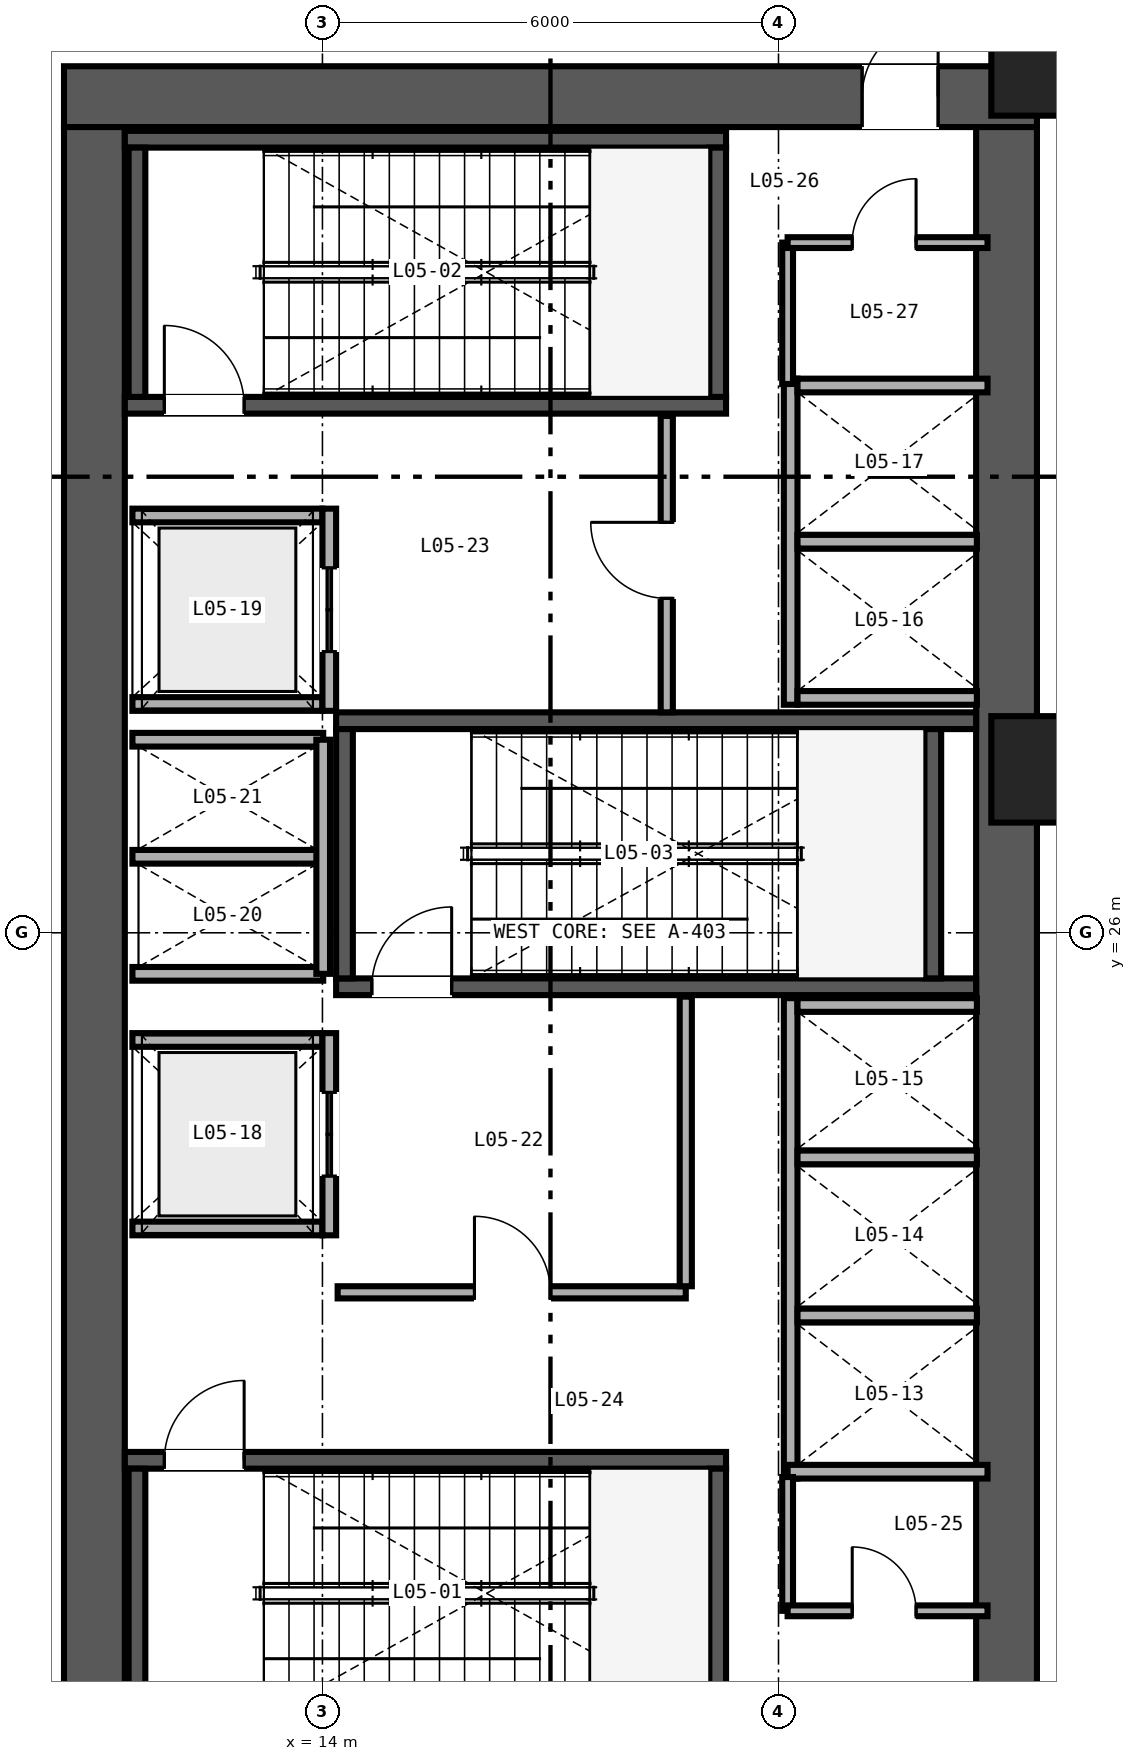
"""IFC4 building model, lengths in metres.
Left out: names, types, materials, properties, quantities, classifications, styles, units other than length and angle.
Written with IfcOpenShell. Run it as: python <this file> out.ifc"""

import sys

from ifc_helpers import new_model, si_unit, direction, frame, frame_2d, origin, origin_2d, place, context, subcontext, project, spatial, rectangle, extrude, source, transform, mapped, element, fill, save


model = new_model("IFC4")
c1 = context("Model", 3, precision=1e-05, world=origin(), true_north=direction((0.0, 1.0)))
c2 = subcontext(c1, "Body", "Model", "MODEL_VIEW")
j1 = project(units=[si_unit("LENGTHUNIT", "METRE"), si_unit("PLANEANGLEUNIT", "RADIAN")], contexts=[c1])
p1 = place(None, origin())
s1 = spatial("IfcSite", under=j1, at=p1, CompositionType="ELEMENT")
p2 = place(p1, origin())
s2 = spatial("IfcBuilding", under=s1, at=p2, CompositionType="ELEMENT")
p3 = place(p2, frame((0.0, 0.0, 24.0)))
s3 = spatial("IfcBuildingStorey", under=s2, at=p3, CompositionType="ELEMENT", Elevation=24.0)
p4 = place(p3, frame((10.6, 37.0, 0.0), z_axis=(0.0, 0.0, 1.0), x_axis=(1.0, 0.0, 0.0)))
e1 = element("IfcWall", 1, at=p4, inside=s3, PredefinedType="SHEAR", context=c2, shape_type="SweptSolid", body=[
    extrude(rectangle(XDim=12.8, YDim=0.8, at=frame_2d((6.4, 0.0))), origin(), (0.0, 0.0, 1.0), 4.48),
])
p5 = place(p4, frame((10.5, 0.0, 0.0)))
e2 = element("IfcOpeningElement", 2, at=p5, cuts=e1, PredefinedType="OPENING", context=c2, shape_type="SweptSolid", body=[
    extrude(rectangle(XDim=1.0, YDim=2.15, at=frame_2d((0.5, 1.075))), frame((0.0, 0.41, 0.0), z_axis=(0.0, -1.0, 0.0), x_axis=(1.0, 0.0, 0.0)), (0.0, 0.0, 1.0), 0.82),
])
for number, where, z_axis, x_axis in (
    (3, (11.0, 15.4, 0.0), (0.0, 0.0, 1.0), (0.0, 1.0, 0.0)),
    (4, (23.0, 15.4, 0.0), (0.0, 0.0, 1.0), (0.0, 1.0, 0.0)),
):
    element("IfcWall", number, at=place(p3, frame(where, z_axis=z_axis, x_axis=x_axis)), inside=s3, PredefinedType="SHEAR", context=c2, shape_type="SweptSolid", body=[
        extrude(rectangle(XDim=21.2, YDim=0.8, at=frame_2d((10.6, 0.0))), origin(), (0.0, 0.0, 1.0), 4.48),
    ])
p6 = place(p3, frame((11.4, 19.06, 0.0), z_axis=(0.0, 0.0, 1.0), x_axis=(1.0, 0.0, 0.0)))
e5 = element("IfcWall", 5, at=p6, inside=s3, PredefinedType="SHEAR", context=c2, shape_type="SweptSolid", body=[
    extrude(rectangle(XDim=7.91, YDim=0.22, at=frame_2d((3.955, 0.0))), origin(), (0.0, 0.0, 1.0), 4.6),
])
p7 = place(p6, frame((0.52, 0.0, 0.0)))
e6 = element("IfcOpeningElement", 6, at=p7, cuts=e5, PredefinedType="OPENING", context=c2, shape_type="SweptSolid", body=[
    extrude(rectangle(XDim=1.05, YDim=2.15, at=frame_2d((0.525, 1.075))), frame((0.0, 0.12, 0.0), z_axis=(0.0, -1.0, 0.0), x_axis=(1.0, 0.0, 0.0)), (0.0, 0.0, 1.0), 0.24),
])
for number, where, z_axis, x_axis in (
    (7, (11.56, 15.67, 0.0), (0.0, 0.0, 1.0), (0.0, 1.0, 0.0)),
    (8, (19.2, 15.67, 0.0), (0.0, 0.0, 1.0), (0.0, 1.0, 0.0)),
):
    element("IfcWall", number, at=place(p3, frame(where, z_axis=z_axis, x_axis=x_axis)), inside=s3, PredefinedType="SHEAR", context=c2, shape_type="SweptSolid", body=[
        extrude(rectangle(XDim=3.28, YDim=0.22, at=frame_2d((1.64, 0.0))), origin(), (0.0, 0.0, 1.0), 4.6),
    ])
p8 = place(p3, frame((11.4, 32.94, 0.0), z_axis=(0.0, 0.0, 1.0), x_axis=(1.0, 0.0, 0.0)))
e9 = element("IfcWall", 9, at=p8, inside=s3, PredefinedType="SHEAR", context=c2, shape_type="SweptSolid", body=[
    extrude(rectangle(XDim=7.91, YDim=0.22, at=frame_2d((3.955, 0.0))), origin(), (0.0, 0.0, 1.0), 4.6),
])
p9 = place(p8, frame((0.52, 0.0, 0.0)))
e10 = element("IfcOpeningElement", 10, at=p9, cuts=e9, PredefinedType="OPENING", context=c2, shape_type="SweptSolid", body=[
    extrude(rectangle(XDim=1.05, YDim=2.15, at=frame_2d((0.525, 1.075))), frame((0.0, 0.12, 0.0), z_axis=(0.0, -1.0, 0.0), x_axis=(1.0, 0.0, 0.0)), (0.0, 0.0, 1.0), 0.24),
])
p10 = place(p3, frame((11.4, 36.44, 0.0), z_axis=(0.0, 0.0, 1.0), x_axis=(1.0, 0.0, 0.0)))
e11 = element("IfcWall", 11, at=p10, inside=s3, PredefinedType="SHEAR", context=c2, shape_type="SweptSolid", body=[
    extrude(rectangle(XDim=7.91, YDim=0.22, at=frame_2d((3.955, 0.0))), origin(), (0.0, 0.0, 1.0), 4.6),
])
for number, where, z_axis, x_axis in (
    (12, (11.56, 33.05, 0.0), (0.0, 0.0, 1.0), (0.0, 1.0, 0.0)),
    (13, (19.2, 33.05, 0.0), (0.0, 0.0, 1.0), (0.0, 1.0, 0.0)),
):
    element("IfcWall", number, at=place(p3, frame(where, z_axis=z_axis, x_axis=x_axis)), inside=s3, PredefinedType="SHEAR", context=c2, shape_type="SweptSolid", body=[
        extrude(rectangle(XDim=3.28, YDim=0.22, at=frame_2d((1.64, 0.0))), origin(), (0.0, 0.0, 1.0), 4.6),
    ])
p11 = place(p3, frame((14.18, 25.29, 0.0), z_axis=(0.0, 0.0, 1.0), x_axis=(1.0, 0.0, 0.0)))
e14 = element("IfcWall", 14, at=p11, inside=s3, PredefinedType="SHEAR", context=c2, shape_type="SweptSolid", body=[
    extrude(rectangle(XDim=8.42, YDim=0.22, at=frame_2d((4.21, 0.0))), origin(), (0.0, 0.0, 1.0), 4.6),
])
p12 = place(p11, frame((0.47, 0.0, 0.0)))
e15 = element("IfcOpeningElement", 15, at=p12, cuts=e14, PredefinedType="OPENING", context=c2, shape_type="SweptSolid", body=[
    extrude(rectangle(XDim=1.05, YDim=2.15, at=frame_2d((0.525, 1.075))), frame((0.0, 0.12, 0.0), z_axis=(0.0, -1.0, 0.0), x_axis=(1.0, 0.0, 0.0)), (0.0, 0.0, 1.0), 0.24),
])
p13 = place(p3, frame((14.18, 28.79, 0.0), z_axis=(0.0, 0.0, 1.0), x_axis=(1.0, 0.0, 0.0)))
e16 = element("IfcWall", 16, at=p13, inside=s3, PredefinedType="SHEAR", context=c2, shape_type="SweptSolid", body=[
    extrude(rectangle(XDim=8.42, YDim=0.22, at=frame_2d((4.21, 0.0))), origin(), (0.0, 0.0, 1.0), 4.6),
])
for number, where, z_axis, x_axis in (
    (17, (14.29, 25.4, 0.0), (0.0, 0.0, 1.0), (0.0, 1.0, 0.0)),
    (18, (22.03, 25.4, 0.0), (0.0, 0.0, 1.0), (0.0, 1.0, 0.0)),
):
    element("IfcWall", number, at=place(p3, frame(where, z_axis=z_axis, x_axis=x_axis)), inside=s3, PredefinedType="SHEAR", context=c2, shape_type="SweptSolid", body=[
        extrude(rectangle(XDim=3.28, YDim=0.22, at=frame_2d((1.64, 0.0))), origin(), (0.0, 0.0, 1.0), 4.6),
    ])
m1 = source(origin(), c2, "Body", "SweptSolid", [
    extrude(rectangle(XDim=1.4, YDim=1.4, at=origin_2d()), origin(), (0.0, 0.0, 1.0), 4.48),
])
for number, where, z_axis, x_axis in (
    (19, (23.5, 28.15, 0.0), (0.0, 0.0, 1.0), (1.0, 0.0, 0.0)),
    (20, (23.5, 37.45, 0.0), (0.0, 0.0, 1.0), (1.0, 0.0, 0.0)),
):
    element("IfcColumn", number, at=place(p3, frame(where, z_axis=z_axis, x_axis=x_axis)), inside=s3, PredefinedType="COLUMN", context=c2, shape_type="MappedRepresentation", body=[
        mapped(m1, transform((0.0, 0.0, 0.0), scale=1.0)),
    ])
p14 = place(p3, frame((20.16, 18.82, 0.0), z_axis=(0.0, 0.0, 1.0), x_axis=(0.0, 1.0, 0.0)))
e21 = element("IfcWall", 21, at=p14, inside=s3, PredefinedType="SOLIDWALL", context=c2, shape_type="SweptSolid", body=[
    extrude(rectangle(XDim=6.32, YDim=0.18, at=frame_2d((3.16, 0.0))), origin(), (0.0, 0.0, 1.0), 3.38),
])
p15 = place(p3, frame((20.12, 18.91, 0.0), z_axis=(0.0, 0.0, 1.0), x_axis=(1.0, 0.0, 0.0)))
e22 = element("IfcWall", 22, at=p15, inside=s3, PredefinedType="SOLIDWALL", context=c2, shape_type="SweptSolid", body=[
    extrude(rectangle(XDim=2.63, YDim=0.18, at=frame_2d((1.315, 0.0))), origin(), (0.0, 0.0, 1.0), 4.48),
])
p16 = place(p3, frame((20.25, 25.05, 0.0), z_axis=(0.0, 0.0, 1.0), x_axis=(1.0, 0.0, 0.0)))
e23 = element("IfcWall", 23, at=p16, inside=s3, PredefinedType="SOLIDWALL", context=c2, shape_type="SweptSolid", body=[
    extrude(rectangle(XDim=2.36, YDim=0.18, at=frame_2d((1.18, 0.0))), origin(), (0.0, 0.0, 1.0), 4.48),
])
p17 = place(p3, frame((20.25, 20.965, 0.0), z_axis=(0.0, 0.0, 1.0), x_axis=(1.0, 0.0, 0.0)))
e24 = element("IfcWall", 24, at=p17, inside=s3, PredefinedType="SOLIDWALL", context=c2, shape_type="SweptSolid", body=[
    extrude(rectangle(XDim=2.36, YDim=0.18, at=frame_2d((1.18, 0.0))), origin(), (0.0, 0.0, 1.0), 3.38),
])
p18 = place(p3, frame((20.25, 23.045, 0.0), z_axis=(0.0, 0.0, 1.0), x_axis=(1.0, 0.0, 0.0)))
e25 = element("IfcWall", 25, at=p18, inside=s3, PredefinedType="SOLIDWALL", context=c2, shape_type="SweptSolid", body=[
    extrude(rectangle(XDim=2.36, YDim=0.18, at=frame_2d((1.18, 0.0))), origin(), (0.0, 0.0, 1.0), 4.48),
])
p19 = place(p3, frame((20.16, 29.0, 0.0), z_axis=(0.0, 0.0, 1.0), x_axis=(0.0, 1.0, 0.0)))
e26 = element("IfcWall", 26, at=p19, inside=s3, PredefinedType="SOLIDWALL", context=c2, shape_type="SweptSolid", body=[
    extrude(rectangle(XDim=4.29, YDim=0.18, at=frame_2d((2.145, 0.0))), origin(), (0.0, 0.0, 1.0), 4.48),
])
p20 = place(p3, frame((20.25, 29.09, 0.0), z_axis=(0.0, 0.0, 1.0), x_axis=(1.0, 0.0, 0.0)))
e27 = element("IfcWall", 27, at=p20, inside=s3, PredefinedType="SOLIDWALL", context=c2, shape_type="SweptSolid", body=[
    extrude(rectangle(XDim=2.36, YDim=0.18, at=frame_2d((1.18, 0.0))), origin(), (0.0, 0.0, 1.0), 4.48),
])
p21 = place(p3, frame((20.25, 33.2, 0.0), z_axis=(0.0, 0.0, 1.0), x_axis=(1.0, 0.0, 0.0)))
e28 = element("IfcWall", 28, at=p21, inside=s3, PredefinedType="SOLIDWALL", context=c2, shape_type="SweptSolid", body=[
    extrude(rectangle(XDim=2.5, YDim=0.18, at=frame_2d((1.25, 0.0))), origin(), (0.0, 0.0, 1.0), 4.48),
])
p22 = place(p3, frame((20.25, 31.145, 0.0), z_axis=(0.0, 0.0, 1.0), x_axis=(1.0, 0.0, 0.0)))
e29 = element("IfcWall", 29, at=p22, inside=s3, PredefinedType="SOLIDWALL", context=c2, shape_type="SweptSolid", body=[
    extrude(rectangle(XDim=2.36, YDim=0.18, at=frame_2d((1.18, 0.0))), origin(), (0.0, 0.0, 1.0), 4.48),
])
for number, where, z_axis, x_axis in (
    (30, (11.5, 22.11, 0.0), (0.0, 0.0, 1.0), (1.0, 0.0, 0.0)),
    (31, (11.5, 24.59, 0.0), (0.0, 0.0, 1.0), (1.0, 0.0, 0.0)),
):
    element("IfcWall", number, at=place(p3, frame(where, z_axis=z_axis, x_axis=x_axis)), inside=s3, PredefinedType="SOLIDWALL", context=c2, shape_type="SweptSolid", body=[
        extrude(rectangle(XDim=2.5, YDim=0.18, at=frame_2d((1.25, 0.0))), origin(), (0.0, 0.0, 1.0), 4.48),
    ])
p23 = place(p3, frame((14.09, 22.02, 0.0), z_axis=(0.0, 0.0, 1.0), x_axis=(0.0, 1.0, 0.0)))
e32 = element("IfcWall", 32, at=p23, inside=s3, PredefinedType="SOLIDWALL", context=c2, shape_type="SweptSolid", body=[
    extrude(rectangle(XDim=2.66, YDim=0.18, at=frame_2d((1.33, 0.0))), origin(), (0.0, 0.0, 1.0), 4.48),
])
p24 = place(p23, frame((0.78, 0.0, 0.0)))
e33 = element("IfcOpeningElement", 33, at=p24, cuts=e32, PredefinedType="OPENING", context=c2, shape_type="SweptSolid", body=[
    extrude(rectangle(XDim=1.1, YDim=2.2, at=frame_2d((0.55, 1.1))), frame((0.0, 0.1, 0.0), z_axis=(0.0, -1.0, 0.0), x_axis=(1.0, 0.0, 0.0)), (0.0, 0.0, 1.0), 0.2),
])
for number, where, z_axis, x_axis in (
    (34, (11.5, 29.01, 0.0), (0.0, 0.0, 1.0), (1.0, 0.0, 0.0)),
    (35, (11.5, 31.49, 0.0), (0.0, 0.0, 1.0), (1.0, 0.0, 0.0)),
):
    element("IfcWall", number, at=place(p3, frame(where, z_axis=z_axis, x_axis=x_axis)), inside=s3, PredefinedType="SOLIDWALL", context=c2, shape_type="SweptSolid", body=[
        extrude(rectangle(XDim=2.5, YDim=0.18, at=frame_2d((1.25, 0.0))), origin(), (0.0, 0.0, 1.0), 4.48),
    ])
p25 = place(p3, frame((14.09, 28.92, 0.0), z_axis=(0.0, 0.0, 1.0), x_axis=(0.0, 1.0, 0.0)))
e36 = element("IfcWall", 36, at=p25, inside=s3, PredefinedType="SOLIDWALL", context=c2, shape_type="SweptSolid", body=[
    extrude(rectangle(XDim=2.66, YDim=0.18, at=frame_2d((1.33, 0.0))), origin(), (0.0, 0.0, 1.0), 4.48),
])
p26 = place(p25, frame((0.78, 0.0, 0.0)))
e37 = element("IfcOpeningElement", 37, at=p26, cuts=e36, PredefinedType="OPENING", context=c2, shape_type="SweptSolid", body=[
    extrude(rectangle(XDim=1.1, YDim=2.2, at=frame_2d((0.55, 1.1))), frame((0.0, 0.1, 0.0), z_axis=(0.0, -1.0, 0.0), x_axis=(1.0, 0.0, 0.0)), (0.0, 0.0, 1.0), 0.2),
])
for number, where, z_axis, x_axis in (
    (38, (11.5, 25.46, 0.0), (0.0, 0.0, 1.0), (1.0, 0.0, 0.0)),
    (39, (11.5, 27.0, 0.0), (0.0, 0.0, 1.0), (1.0, 0.0, 0.0)),
    (40, (11.5, 28.54, 0.0), (0.0, 0.0, 1.0), (1.0, 0.0, 0.0)),
):
    element("IfcWall", number, at=place(p3, frame(where, z_axis=z_axis, x_axis=x_axis)), inside=s3, PredefinedType="SOLIDWALL", context=c2, shape_type="SweptSolid", body=[
        extrude(rectangle(XDim=2.51, YDim=0.18, at=frame_2d((1.255, 0.0))), origin(), (0.0, 0.0, 1.0), 4.48),
    ])
p27 = place(p3, frame((14.01, 25.46, 0.0), z_axis=(0.0, 0.0, 1.0), x_axis=(0.0, 1.0, 0.0)))
e41 = element("IfcWall", 41, at=p27, inside=s3, PredefinedType="SOLIDWALL", context=c2, shape_type="SweptSolid", body=[
    extrude(rectangle(XDim=3.08, YDim=0.18, at=frame_2d((1.54, 0.0))), origin(), (0.0, 0.0, 1.0), 4.48),
])
p28 = place(p3, frame((14.2, 21.27, 0.0), z_axis=(0.0, 0.0, 1.0), x_axis=(1.0, 0.0, 0.0)))
e42 = element("IfcWall", 42, at=p28, inside=s3, PredefinedType="PARTITIONING", context=c2, shape_type="SweptSolid", body=[
    extrude(rectangle(XDim=4.58, YDim=0.16, at=frame_2d((2.29, 0.0))), origin(), (0.0, 0.0, 1.0), 4.48),
])
p29 = place(p28, frame((1.8, 0.0, 0.0)))
e43 = element("IfcOpeningElement", 43, at=p29, cuts=e42, PredefinedType="OPENING", context=c2, shape_type="SweptSolid", body=[
    extrude(rectangle(XDim=1.0, YDim=2.15, at=frame_2d((0.5, 1.075))), frame((0.0, 0.09, 0.0), z_axis=(0.0, -1.0, 0.0), x_axis=(1.0, 0.0, 0.0)), (0.0, 0.0, 1.0), 0.18),
])
p30 = place(p3, frame((18.78, 21.35, 0.0), z_axis=(0.0, 0.0, 1.0), x_axis=(0.0, 1.0, 0.0)))
e44 = element("IfcWall", 44, at=p30, inside=s3, PredefinedType="PARTITIONING", context=c2, shape_type="SweptSolid", body=[
    extrude(rectangle(XDim=3.81, YDim=0.16, at=frame_2d((1.905, 0.0))), origin(), (0.0, 0.0, 1.0), 4.48),
])
p31 = place(p3, frame((18.53, 28.9, 0.0), z_axis=(0.0, 0.0, 1.0), x_axis=(0.0, 1.0, 0.0)))
e45 = element("IfcWall", 45, at=p31, inside=s3, PredefinedType="PARTITIONING", context=c2, shape_type="SweptSolid", body=[
    extrude(rectangle(XDim=3.9, YDim=0.16, at=frame_2d((1.95, 0.0))), origin(), (0.0, 0.0, 1.0), 4.48),
])
p32 = place(p31, frame((1.5, 0.0, 0.0)))
e46 = element("IfcOpeningElement", 46, at=p32, cuts=e45, PredefinedType="OPENING", context=c2, shape_type="SweptSolid", body=[
    extrude(rectangle(XDim=1.0, YDim=2.15, at=frame_2d((0.5, 1.075))), frame((0.0, 0.09, 0.0), z_axis=(0.0, -1.0, 0.0), x_axis=(1.0, 0.0, 0.0)), (0.0, 0.0, 1.0), 0.18),
])
p33 = place(p3, frame((20.12, 17.08, 0.0), z_axis=(0.0, 0.0, 1.0), x_axis=(0.0, 1.0, 0.0)))
e47 = element("IfcWall", 47, at=p33, inside=s3, PredefinedType="PARTITIONING", context=c2, shape_type="SweptSolid", body=[
    extrude(rectangle(XDim=1.76, YDim=0.142, at=frame_2d((0.88, 0.0))), origin(), (0.0, 0.0, 1.0), 4.48),
])
p34 = place(p3, frame((20.12, 17.08, 0.0), z_axis=(0.0, 0.0, 1.0), x_axis=(1.0, 0.0, 0.0)))
e48 = element("IfcWall", 48, at=p34, inside=s3, PredefinedType="PARTITIONING", context=c2, shape_type="SweptSolid", body=[
    extrude(rectangle(XDim=2.63, YDim=0.142, at=frame_2d((1.315, 0.0))), origin(), (0.0, 0.0, 1.0), 4.48),
])
p35 = place(p34, frame((0.85, 0.0, 0.0)))
e49 = element("IfcOpeningElement", 49, at=p35, cuts=e48, PredefinedType="OPENING", context=c2, shape_type="SweptSolid", body=[
    extrude(rectangle(XDim=0.84, YDim=2.1, at=frame_2d((0.42, 1.05))), frame((0.0, 0.081, 0.0), z_axis=(0.0, -1.0, 0.0), x_axis=(1.0, 0.0, 0.0)), (0.0, 0.0, 1.0), 0.162),
])
p36 = place(p3, frame((20.12, 33.22, 0.0), z_axis=(0.0, 0.0, 1.0), x_axis=(0.0, 1.0, 0.0)))
e50 = element("IfcWall", 50, at=p36, inside=s3, PredefinedType="PARTITIONING", context=c2, shape_type="SweptSolid", body=[
    extrude(rectangle(XDim=1.86, YDim=0.142, at=frame_2d((0.93, 0.0))), origin(), (0.0, 0.0, 1.0), 4.48),
])
p37 = place(p3, frame((20.12, 35.08, 0.0), z_axis=(0.0, 0.0, 1.0), x_axis=(1.0, 0.0, 0.0)))
e51 = element("IfcWall", 51, at=p37, inside=s3, PredefinedType="PARTITIONING", context=c2, shape_type="SweptSolid", body=[
    extrude(rectangle(XDim=2.63, YDim=0.142, at=frame_2d((1.315, 0.0))), origin(), (0.0, 0.0, 1.0), 4.48),
])
p38 = place(p37, frame((0.85, 0.0, 0.0)))
e52 = element("IfcOpeningElement", 52, at=p38, cuts=e51, PredefinedType="OPENING", context=c2, shape_type="SweptSolid", body=[
    extrude(rectangle(XDim=0.84, YDim=2.1, at=frame_2d((0.42, 1.05))), frame((0.0, 0.081, 0.0), z_axis=(0.0, -1.0, 0.0), x_axis=(1.0, 0.0, 0.0)), (0.0, 0.0, 1.0), 0.162),
])
m2 = source(origin(), c2, "Body", "SweptSolid", [
    extrude(rectangle(XDim=1.05, YDim=2.15, at=frame_2d((0.525, 1.075))), frame((0.0, 0.025, 0.0), z_axis=(0.0, -1.0, 0.0), x_axis=(1.0, 0.0, 0.0)), (0.0, 0.0, 1.0), 0.05),
])
p39 = place(p7, origin())
e53 = element("IfcDoor", 53, at=p39, inside=s3, OperationType="SINGLE_SWING_RIGHT", PredefinedType="DOOR", context=c2, shape_type="MappedRepresentation", body=[
    mapped(m2, transform((0.0, 0.0, 0.0), scale=1.0)),
])
fill(e6, e53)
p40 = place(p9, origin())
e54 = element("IfcDoor", 54, at=p40, inside=s3, OperationType="SINGLE_SWING_LEFT", PredefinedType="DOOR", context=c2, shape_type="MappedRepresentation", body=[
    mapped(m2, transform((0.0, 0.0, 0.0), scale=1.0)),
])
fill(e10, e54)
p41 = place(p12, origin())
e55 = element("IfcDoor", 55, at=p41, inside=s3, OperationType="SINGLE_SWING_RIGHT", PredefinedType="DOOR", context=c2, shape_type="MappedRepresentation", body=[
    mapped(m2, transform((0.0, 0.0, 0.0), scale=1.0)),
])
fill(e15, e55)
m3 = source(origin(), c2, "Body", "SweptSolid", [
    extrude(rectangle(XDim=1.1, YDim=2.2, at=frame_2d((0.55, 1.1))), frame((0.0, 0.025, 0.0), z_axis=(0.0, -1.0, 0.0), x_axis=(1.0, 0.0, 0.0)), (0.0, 0.0, 1.0), 0.05),
])
p42 = place(p24, origin())
e56 = element("IfcDoor", 56, at=p42, inside=s3, OperationType="DOUBLE_DOOR_SLIDING", PredefinedType="DOOR", context=c2, shape_type="MappedRepresentation", body=[
    mapped(m3, transform((0.0, 0.0, 0.0), scale=1.0)),
])
fill(e33, e56)
p43 = place(p26, origin())
e57 = element("IfcDoor", 57, at=p43, inside=s3, OperationType="DOUBLE_DOOR_SLIDING", PredefinedType="DOOR", context=c2, shape_type="MappedRepresentation", body=[
    mapped(m3, transform((0.0, 0.0, 0.0), scale=1.0)),
])
fill(e37, e57)
m4 = source(origin(), c2, "Body", "SweptSolid", [
    extrude(rectangle(XDim=1.0, YDim=2.15, at=frame_2d((0.5, 1.075))), frame((0.0, 0.025, 0.0), z_axis=(0.0, -1.0, 0.0), x_axis=(1.0, 0.0, 0.0)), (0.0, 0.0, 1.0), 0.05),
])
p44 = place(p29, origin())
e58 = element("IfcDoor", 58, at=p44, inside=s3, OperationType="SINGLE_SWING_LEFT", PredefinedType="DOOR", context=c2, shape_type="MappedRepresentation", body=[
    mapped(m4, transform((0.0, 0.0, 0.0), scale=1.0)),
])
fill(e43, e58)
p45 = place(p32, origin())
e59 = element("IfcDoor", 59, at=p45, inside=s3, OperationType="SINGLE_SWING_RIGHT", PredefinedType="DOOR", context=c2, shape_type="MappedRepresentation", body=[
    mapped(m4, transform((0.0, 0.0, 0.0), scale=1.0)),
])
fill(e46, e59)
m5 = source(origin(), c2, "Body", "SweptSolid", [
    extrude(rectangle(XDim=0.84, YDim=2.1, at=frame_2d((0.42, 1.05))), frame((0.0, 0.025, 0.0), z_axis=(0.0, -1.0, 0.0), x_axis=(1.0, 0.0, 0.0)), (0.0, 0.0, 1.0), 0.05),
])
p46 = place(p35, origin())
e60 = element("IfcDoor", 60, at=p46, inside=s3, OperationType="SINGLE_SWING_LEFT", PredefinedType="DOOR", context=c2, shape_type="MappedRepresentation", body=[
    mapped(m5, transform((0.0, 0.0, 0.0), scale=1.0)),
])
fill(e49, e60)
p47 = place(p38, origin())
e61 = element("IfcDoor", 61, at=p47, inside=s3, OperationType="SINGLE_SWING_RIGHT", PredefinedType="DOOR", context=c2, shape_type="MappedRepresentation", body=[
    mapped(m5, transform((0.0, 0.0, 0.0), scale=1.0)),
])
fill(e52, e61)
p48 = place(p5, origin())
e62 = element("IfcDoor", 62, at=p48, inside=s3, OperationType="SINGLE_SWING_RIGHT", PredefinedType="DOOR", context=c2, shape_type="MappedRepresentation", body=[
    mapped(m4, transform((0.0, 0.0, 0.0), scale=1.0)),
])
fill(e2, e62)
save(model, sys.argv[1])
